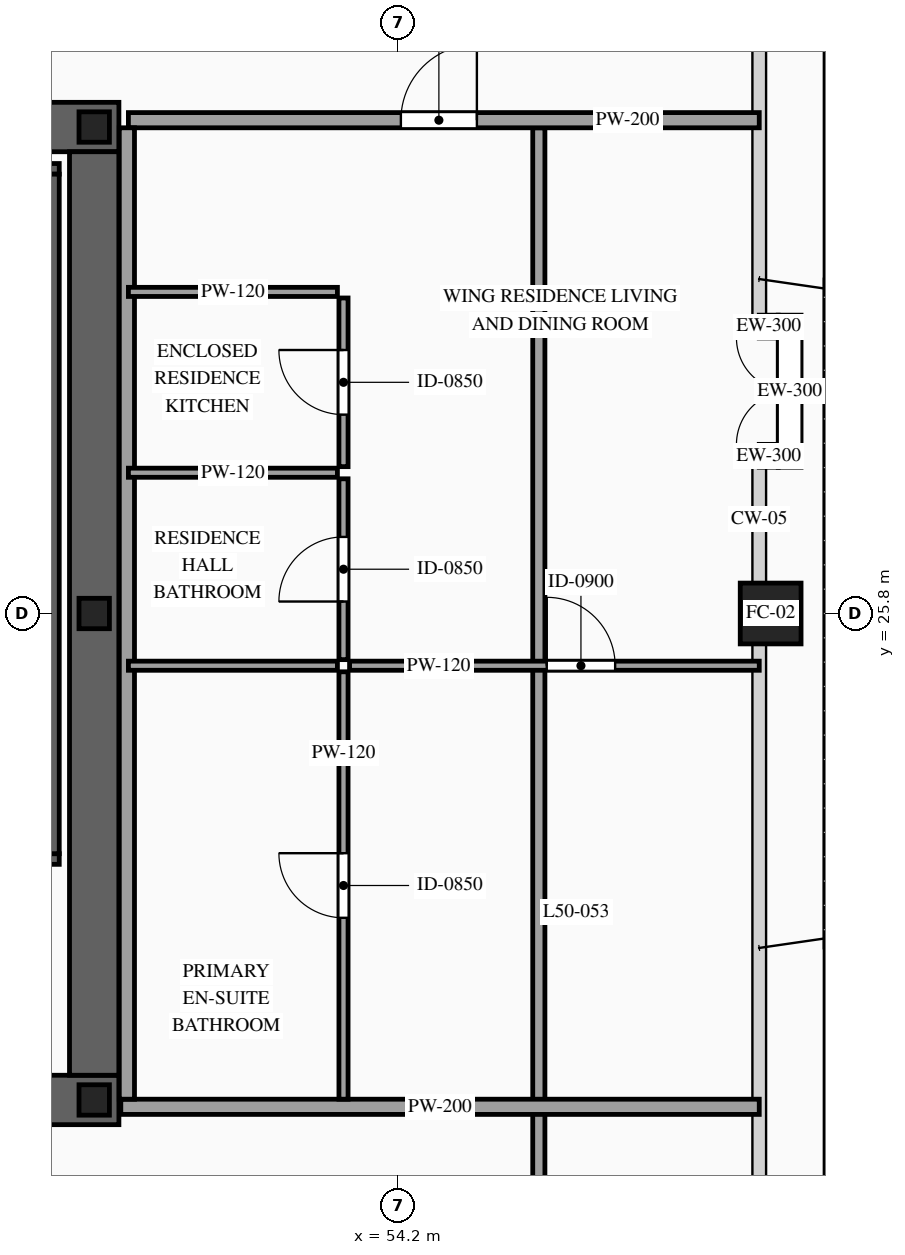
"""IFC4 building model, lengths in metres.
Left out: names, types, materials, properties, quantities, classifications, styles, units other than length and angle.
Written with IfcOpenShell. Run it as: python <this file> out.ifc"""

import sys

from ifc_helpers import new_model, si_unit, direction, frame, frame_2d, origin, origin_2d, place, context, subcontext, project, spatial, rectangle, hollow_rectangle, i_section, extrude, source, transform, mapped, element, fill, save


model = new_model("IFC4")
c1 = context("Model", 3, precision=1e-05, world=origin(), true_north=direction((0.0, 1.0)))
c2 = subcontext(c1, "Body", "Model", "MODEL_VIEW")
j1 = project(units=[si_unit("LENGTHUNIT", "METRE"), si_unit("PLANEANGLEUNIT", "RADIAN")], contexts=[c1])
p1 = place(None, origin())
s1 = spatial("IfcSite", under=j1, at=p1, CompositionType="ELEMENT")
p2 = place(p1, origin())
s2 = spatial("IfcBuilding", under=s1, at=p2, CompositionType="ELEMENT")
p3 = place(p2, frame((0.0, 0.0, 191.5)))
s3 = spatial("IfcBuildingStorey", under=s2, at=p3, CompositionType="ELEMENT", Elevation=191.5)
p4 = place(p3, frame((23.475, 19.4, 0.0), z_axis=(0.0, 0.0, 1.0), x_axis=(1.0, 0.0, 0.0)))
e1 = element("IfcWall", 1, at=p4, inside=s3, PredefinedType="SHEAR", context=c2, shape_type="SweptSolid", body=[
    extrude(rectangle(XDim=27.05, YDim=0.65, at=frame_2d((13.525, 0.0))), origin(), (0.0, 0.0, 1.0), 3.5),
])
p5 = place(p4, frame((1.975, 0.0, 0.0)))
e2 = element("IfcOpeningElement", 2, at=p5, cuts=e1, PredefinedType="OPENING", context=c2, shape_type="SweptSolid", body=[
    extrude(rectangle(XDim=1.1, YDim=2.2, at=frame_2d((0.55, 1.1))), frame((0.0, 0.34, 0.0), z_axis=(0.0, -1.0, 0.0), x_axis=(1.0, 0.0, 0.0)), (0.0, 0.0, 1.0), 0.68),
])
p6 = place(p4, frame((9.875, 0.0, 0.0)))
e3 = element("IfcOpeningElement", 3, at=p6, cuts=e1, PredefinedType="OPENING", context=c2, shape_type="SweptSolid", body=[
    extrude(rectangle(XDim=1.1, YDim=2.2, at=frame_2d((0.55, 1.1))), frame((0.0, 0.34, 0.0), z_axis=(0.0, -1.0, 0.0), x_axis=(1.0, 0.0, 0.0)), (0.0, 0.0, 1.0), 0.68),
])
p7 = place(p4, frame((23.075, 0.0, 0.0)))
e4 = element("IfcOpeningElement", 4, at=p7, cuts=e1, PredefinedType="OPENING", context=c2, shape_type="SweptSolid", body=[
    extrude(rectangle(XDim=1.1, YDim=2.2, at=frame_2d((0.55, 1.1))), frame((0.0, 0.34, 0.0), z_axis=(0.0, -1.0, 0.0), x_axis=(1.0, 0.0, 0.0)), (0.0, 0.0, 1.0), 0.68),
])
p8 = place(p4, frame((19.695, 0.0, 0.0)))
e5 = element("IfcOpeningElement", 5, at=p8, cuts=e1, PredefinedType="OPENING", context=c2, shape_type="SweptSolid", body=[
    extrude(rectangle(XDim=0.9, YDim=2.15, at=frame_2d((0.45, 1.075))), frame((0.0, 0.34, 0.0), z_axis=(0.0, -1.0, 0.0), x_axis=(1.0, 0.0, 0.0)), (0.0, 0.0, 1.0), 0.68),
])
p9 = place(p4, frame((18.255, 0.0, 0.0)))
e6 = element("IfcOpeningElement", 6, at=p9, cuts=e1, PredefinedType="OPENING", context=c2, shape_type="SweptSolid", body=[
    extrude(rectangle(XDim=0.9, YDim=2.15, at=frame_2d((0.45, 1.075))), frame((0.0, 0.34, 0.0), z_axis=(0.0, -1.0, 0.0), x_axis=(1.0, 0.0, 0.0)), (0.0, 0.0, 1.0), 0.68),
])
p10 = place(p3, frame((23.475, 32.2, 0.0), z_axis=(0.0, 0.0, 1.0), x_axis=(1.0, 0.0, 0.0)))
e7 = element("IfcWall", 7, at=p10, inside=s3, PredefinedType="SHEAR", context=c2, shape_type="SweptSolid", body=[
    extrude(rectangle(XDim=27.05, YDim=0.65, at=frame_2d((13.525, 0.0))), origin(), (0.0, 0.0, 1.0), 3.5),
])
p11 = place(p10, frame((4.595, 0.0, 0.0)))
e8 = element("IfcOpeningElement", 8, at=p11, cuts=e7, PredefinedType="OPENING", context=c2, shape_type="SweptSolid", body=[
    extrude(rectangle(XDim=0.9, YDim=2.15, at=frame_2d((0.45, 1.075))), frame((0.0, 0.34, 0.0), z_axis=(0.0, -1.0, 0.0), x_axis=(1.0, 0.0, 0.0)), (0.0, 0.0, 1.0), 0.68),
])
p12 = place(p10, frame((9.875, 0.0, 0.0)))
e9 = element("IfcOpeningElement", 9, at=p12, cuts=e7, PredefinedType="OPENING", context=c2, shape_type="SweptSolid", body=[
    extrude(rectangle(XDim=1.1, YDim=2.2, at=frame_2d((0.55, 1.1))), frame((0.0, 0.34, 0.0), z_axis=(0.0, -1.0, 0.0), x_axis=(1.0, 0.0, 0.0)), (0.0, 0.0, 1.0), 0.68),
])
p13 = place(p10, frame((15.725, 0.0, 0.0)))
e10 = element("IfcOpeningElement", 10, at=p13, cuts=e7, PredefinedType="OPENING", context=c2, shape_type="SweptSolid", body=[
    extrude(rectangle(XDim=1.1, YDim=2.2, at=frame_2d((0.55, 1.1))), frame((0.0, 0.34, 0.0), z_axis=(0.0, -1.0, 0.0), x_axis=(1.0, 0.0, 0.0)), (0.0, 0.0, 1.0), 0.68),
])
p14 = place(p10, frame((18.255, 0.0, 0.0)))
e11 = element("IfcOpeningElement", 11, at=p14, cuts=e7, PredefinedType="OPENING", context=c2, shape_type="SweptSolid", body=[
    extrude(rectangle(XDim=0.9, YDim=2.15, at=frame_2d((0.45, 1.075))), frame((0.0, 0.34, 0.0), z_axis=(0.0, -1.0, 0.0), x_axis=(1.0, 0.0, 0.0)), (0.0, 0.0, 1.0), 0.68),
])
p15 = place(p10, frame((19.695, 0.0, 0.0)))
e12 = element("IfcOpeningElement", 12, at=p15, cuts=e7, PredefinedType="OPENING", context=c2, shape_type="SweptSolid", body=[
    extrude(rectangle(XDim=0.9, YDim=2.15, at=frame_2d((0.45, 1.075))), frame((0.0, 0.34, 0.0), z_axis=(0.0, -1.0, 0.0), x_axis=(1.0, 0.0, 0.0)), (0.0, 0.0, 1.0), 0.68),
])
m1 = source(origin(), c2, "Body", "SweptSolid", [
    extrude(rectangle(XDim=12.15, YDim=0.65, at=frame_2d((6.075, 0.0))), origin(), (0.0, 0.0, 1.0), 3.5),
])
p16 = place(p3, frame((50.2, 19.725, 0.0), z_axis=(0.0, 0.0, 1.0), x_axis=(0.0, 1.0, 0.0)))
e13 = element("IfcWall", 13, at=p16, inside=s3, PredefinedType="SHEAR", context=c2, shape_type="MappedRepresentation", body=[
    mapped(m1, transform((0.0, 0.0, 0.0), scale=1.0)),
])
m2 = source(origin(), c2, "Body", "SweptSolid", [
    extrude(i_section(OverallWidth=0.4, OverallDepth=0.4, WebThickness=0.013, FlangeThickness=0.021, at=origin_2d()), origin(), (0.0, 0.0, 1.0), 3.5),
])
for number, where, z_axis, x_axis in (
    (14, (50.2, 19.4, 0.0), (0.0, 0.0, 1.0), (1.0, 0.0, 0.0)),
    (15, (50.2, 25.8, 0.0), (0.0, 0.0, 1.0), (1.0, 0.0, 0.0)),
    (16, (50.2, 32.2, 0.0), (0.0, 0.0, 1.0), (1.0, 0.0, 0.0)),
):
    element("IfcColumn", number, at=place(p3, frame(where, z_axis=z_axis, x_axis=x_axis)), inside=s3, PredefinedType="COLUMN", context=c2, shape_type="MappedRepresentation", body=[
        mapped(m2, transform((0.0, 0.0, 0.0), scale=1.0)),
    ])
m3 = source(origin(), c2, "Body", "SweptSolid", [
    extrude(hollow_rectangle(XDim=0.8, YDim=0.8, WallThickness=0.036, at=origin_2d()), origin(), (0.0, 0.0, 1.0), 3.5),
])
p17 = place(p3, frame((59.1, 25.8, 0.0), z_axis=(0.0, 0.0, 1.0), x_axis=(1.0, 0.0, 0.0)))
e17 = element("IfcColumn", 17, at=p17, inside=s3, PredefinedType="COLUMN", context=c2, shape_type="MappedRepresentation", body=[
    mapped(m3, transform((0.0, 0.0, 0.0), scale=1.0)),
])
p18 = place(p3, frame((59.35, 27.725, 0.0), z_axis=(0.0, 0.0, 1.0), x_axis=(0.0, 1.0, 0.0)))
e18 = element("IfcWall", 18, at=p18, inside=s3, PredefinedType="SOLIDWALL", context=c2, shape_type="SweptSolid", body=[
    extrude(rectangle(XDim=2.0, YDim=0.3, at=frame_2d((1.0, 0.0))), origin(), (0.0, 0.0, 1.0), 2.835),
])
p19 = place(p18, frame((0.3, 0.0, 0.0)))
e19 = element("IfcOpeningElement", 19, at=p19, cuts=e18, PredefinedType="OPENING", context=c2, shape_type="SweptSolid", body=[
    extrude(rectangle(XDim=1.4, YDim=2.3, at=frame_2d((0.7, 1.15))), frame((0.0, 0.165, 0.0), z_axis=(0.0, -1.0, 0.0), x_axis=(1.0, 0.0, 0.0)), (0.0, 0.0, 1.0), 0.33),
])
m4 = source(origin(), c2, "Body", "SweptSolid", [
    extrude(rectangle(XDim=0.25, YDim=0.3, at=frame_2d((0.125, 0.0))), origin(), (0.0, 0.0, 1.0), 3.28),
])
for number, where, z_axis, x_axis in (
    (20, (58.95, 27.875, 0.0), (0.0, 0.0, 1.0), (1.0, 0.0, 0.0)),
    (21, (59.2, 29.575, 0.0), (0.0, 0.0, 1.0), (-1.0, 0.0, 0.0)),
):
    element("IfcWall", number, at=place(p3, frame(where, z_axis=z_axis, x_axis=x_axis)), inside=s3, PredefinedType="SOLIDWALL", context=c2, shape_type="MappedRepresentation", body=[
        mapped(m4, transform((0.0, 0.0, 0.0), scale=1.0)),
    ])
p20 = place(p3, frame((46.46, 22.57, 0.0), z_axis=(0.0, 0.0, 1.0), x_axis=(1.0, 0.0, 0.0)))
e22 = element("IfcWall", 22, at=p20, inside=s3, PredefinedType="SOLIDWALL", context=c2, shape_type="SweptSolid", body=[
    extrude(rectangle(XDim=3.28, YDim=0.14, at=frame_2d((1.64, 0.0))), origin(), (0.0, 0.0, 1.0), 3.28),
])
p21 = place(p20, frame((1.09, 0.0, 0.0)))
e23 = element("IfcOpeningElement", 23, at=p21, cuts=e22, PredefinedType="OPENING", context=c2, shape_type="SweptSolid", body=[
    extrude(rectangle(XDim=1.1, YDim=2.2, at=frame_2d((0.55, 1.1))), frame((0.0, 0.085, 0.0), z_axis=(0.0, -1.0, 0.0), x_axis=(1.0, 0.0, 0.0)), (0.0, 0.0, 1.0), 0.17),
])
m5 = source(origin(), c2, "Body", "SweptSolid", [
    extrude(rectangle(XDim=3.28, YDim=0.14, at=frame_2d((1.64, 0.0))), origin(), (0.0, 0.0, 1.0), 3.28),
])
p22 = place(p3, frame((46.46, 31.65, 0.0), z_axis=(0.0, 0.0, 1.0), x_axis=(1.0, 0.0, 0.0)))
e24 = element("IfcWall", 24, at=p22, inside=s3, PredefinedType="SOLIDWALL", context=c2, shape_type="MappedRepresentation", body=[
    mapped(m5, transform((0.0, 0.0, 0.0), scale=1.0)),
])
m6 = source(origin(), c2, "Body", "SweptSolid", [
    extrude(rectangle(XDim=8.94, YDim=0.14, at=frame_2d((4.47, 0.0))), origin(), (0.0, 0.0, 1.0), 3.28),
])
p23 = place(p3, frame((49.67, 22.64, 0.0), z_axis=(0.0, 0.0, 1.0), x_axis=(0.0, 1.0, 0.0)))
e25 = element("IfcWall", 25, at=p23, inside=s3, PredefinedType="SOLIDWALL", context=c2, shape_type="MappedRepresentation", body=[
    mapped(m6, transform((0.0, 0.0, 0.0), scale=1.0)),
])
m7 = source(origin(), c2, "Body", "SweptSolid", [
    extrude(rectangle(XDim=28.19, YDim=0.16, at=frame_2d((14.095, 0.0))), origin(), (0.0, 0.0, 1.0), 3.28),
])
p24 = place(p3, frame((56.05, 4.0, 0.0), z_axis=(0.0, 0.0, 1.0), x_axis=(0.0, 1.0, 0.0)))
e26 = element("IfcWall", 26, at=p24, inside=s3, PredefinedType="PARTITIONING", context=c2, shape_type="MappedRepresentation", body=[
    mapped(m7, transform((0.0, 0.0, 0.0), scale=1.0)),
])
p25 = place(p3, frame((50.65, 32.29, 0.0), z_axis=(0.0, 0.0, 1.0), x_axis=(1.0, 0.0, 0.0)))
e27 = element("IfcWall", 27, at=p25, inside=s3, PredefinedType="PARTITIONING", context=c2, shape_type="SweptSolid", body=[
    extrude(rectangle(XDim=8.3, YDim=0.2, at=frame_2d((4.15, 0.0))), origin(), (0.0, 0.0, 1.0), 2.775),
])
p26 = place(p25, frame((3.585, 0.0, 0.0)))
e28 = element("IfcOpeningElement", 28, at=p26, cuts=e27, PredefinedType="OPENING", context=c2, shape_type="SweptSolid", body=[
    extrude(rectangle(XDim=1.0, YDim=2.2, at=frame_2d((0.5, 1.1))), frame((0.0, 0.115, 0.0), z_axis=(0.0, -1.0, 0.0), x_axis=(1.0, 0.0, 0.0)), (0.0, 0.0, 1.0), 0.23),
])
m8 = source(origin(), c2, "Body", "SweptSolid", [
    extrude(rectangle(XDim=8.4, YDim=0.2, at=frame_2d((4.2, 0.0))), origin(), (0.0, 0.0, 1.0), 2.775),
])
p27 = place(p3, frame((50.55, 19.31, 0.0), z_axis=(0.0, 0.0, 1.0), x_axis=(1.0, 0.0, 0.0)))
e29 = element("IfcWall", 29, at=p27, inside=s3, PredefinedType="PARTITIONING", context=c2, shape_type="MappedRepresentation", body=[
    mapped(m8, transform((0.0, 0.0, 0.0), scale=1.0)),
])
m9 = source(origin(), c2, "Body", "SweptSolid", [
    extrude(rectangle(XDim=12.78, YDim=0.2, at=frame_2d((6.39, 0.0))), origin(), (0.0, 0.0, 1.0), 3.28),
])
p28 = place(p3, frame((50.63, 19.41, 0.0), z_axis=(0.0, 0.0, 1.0), x_axis=(0.0, 1.0, 0.0)))
e30 = element("IfcWall", 30, at=p28, inside=s3, PredefinedType="PARTITIONING", context=c2, shape_type="MappedRepresentation", body=[
    mapped(m9, transform((0.0, 0.0, 0.0), scale=1.0)),
])
m10 = source(origin(), c2, "Body", "SweptSolid", [
    extrude(rectangle(XDim=2.75, YDim=0.12, at=frame_2d((1.375, 0.0))), origin(), (0.0, 0.0, 1.0), 3.28),
])
for number, where, z_axis, x_axis in (
    (31, (50.65, 25.113, 0.0), (0.0, 0.0, 1.0), (1.0, 0.0, 0.0)),
    (32, (50.65, 27.652, 0.0), (0.0, 0.0, 1.0), (1.0, 0.0, 0.0)),
):
    element("IfcWall", number, at=place(p3, frame(where, z_axis=z_axis, x_axis=x_axis)), inside=s3, PredefinedType="PARTITIONING", context=c2, shape_type="MappedRepresentation", body=[
        mapped(m10, transform((0.0, 0.0, 0.0), scale=1.0)),
    ])
p29 = place(p3, frame((53.48, 25.193, 0.0), z_axis=(0.0, 0.0, 1.0), x_axis=(0.0, 1.0, 0.0)))
e33 = element("IfcWall", 33, at=p29, inside=s3, PredefinedType="PARTITIONING", context=c2, shape_type="SweptSolid", body=[
    extrude(rectangle(XDim=2.379, YDim=0.12, at=frame_2d((1.189, 0.0))), origin(), (0.0, 0.0, 1.0), 3.28),
])
p30 = place(p29, frame((0.764, 0.0, 0.0)))
e34 = element("IfcOpeningElement", 34, at=p30, cuts=e33, PredefinedType="OPENING", context=c2, shape_type="SweptSolid", body=[
    extrude(rectangle(XDim=0.85, YDim=2.1, at=frame_2d((0.425, 1.05))), frame((0.0, 0.075, 0.0), z_axis=(0.0, -1.0, 0.0), x_axis=(1.0, 0.0, 0.0)), (0.0, 0.0, 1.0), 0.15),
])
p31 = place(p3, frame((50.65, 30.031, 0.0), z_axis=(0.0, 0.0, 1.0), x_axis=(1.0, 0.0, 0.0)))
e35 = element("IfcWall", 35, at=p31, inside=s3, PredefinedType="PARTITIONING", context=c2, shape_type="MappedRepresentation", body=[
    mapped(m10, transform((0.0, 0.0, 0.0), scale=1.0)),
])
p32 = place(p3, frame((53.48, 27.732, 0.0), z_axis=(0.0, 0.0, 1.0), x_axis=(0.0, 1.0, 0.0)))
e36 = element("IfcWall", 36, at=p32, inside=s3, PredefinedType="PARTITIONING", context=c2, shape_type="SweptSolid", body=[
    extrude(rectangle(XDim=2.219, YDim=0.12, at=frame_2d((1.109, 0.0))), origin(), (0.0, 0.0, 1.0), 3.28),
])
p33 = place(p32, frame((0.685, 0.0, 0.0)))
e37 = element("IfcOpeningElement", 37, at=p33, cuts=e36, PredefinedType="OPENING", context=c2, shape_type="SweptSolid", body=[
    extrude(rectangle(XDim=0.85, YDim=2.1, at=frame_2d((0.425, 1.05))), frame((0.0, 0.075, 0.0), z_axis=(0.0, -1.0, 0.0), x_axis=(1.0, 0.0, 0.0)), (0.0, 0.0, 1.0), 0.15),
])
p34 = place(p3, frame((53.56, 25.113, 0.0), z_axis=(0.0, 0.0, 1.0), x_axis=(1.0, 0.0, 0.0)))
e38 = element("IfcWall", 38, at=p34, inside=s3, PredefinedType="PARTITIONING", context=c2, shape_type="SweptSolid", body=[
    extrude(rectangle(XDim=5.39, YDim=0.12, at=frame_2d((2.695, 0.0))), origin(), (0.0, 0.0, 1.0), 3.28),
])
p35 = place(p34, frame((2.594, 0.0, 0.0)))
e39 = element("IfcOpeningElement", 39, at=p35, cuts=e38, PredefinedType="OPENING", context=c2, shape_type="SweptSolid", body=[
    extrude(rectangle(XDim=0.9, YDim=2.15, at=frame_2d((0.45, 1.075))), frame((0.0, 0.075, 0.0), z_axis=(0.0, -1.0, 0.0), x_axis=(1.0, 0.0, 0.0)), (0.0, 0.0, 1.0), 0.15),
])
p36 = place(p3, frame((53.48, 19.41, 0.0), z_axis=(0.0, 0.0, 1.0), x_axis=(0.0, 1.0, 0.0)))
e40 = element("IfcWall", 40, at=p36, inside=s3, PredefinedType="PARTITIONING", context=c2, shape_type="SweptSolid", body=[
    extrude(rectangle(XDim=5.623, YDim=0.12, at=frame_2d((2.812, 0.0))), origin(), (0.0, 0.0, 1.0), 3.28),
])
p37 = place(p36, frame((2.386, 0.0, 0.0)))
e41 = element("IfcOpeningElement", 41, at=p37, cuts=e40, PredefinedType="OPENING", context=c2, shape_type="SweptSolid", body=[
    extrude(rectangle(XDim=0.85, YDim=2.1, at=frame_2d((0.425, 1.05))), frame((0.0, 0.075, 0.0), z_axis=(0.0, -1.0, 0.0), x_axis=(1.0, 0.0, 0.0)), (0.0, 0.0, 1.0), 0.15),
])
m11 = source(origin(), c2, "Body", "SweptSolid", [
    extrude(rectangle(XDim=1.4, YDim=2.3, at=frame_2d((0.7, 1.15))), frame((0.0, 0.025, 0.0), z_axis=(0.0, -1.0, 0.0), x_axis=(1.0, 0.0, 0.0)), (0.0, 0.0, 1.0), 0.05),
])
p38 = place(p19, origin())
e42 = element("IfcDoor", 42, at=p38, inside=s3, OperationType="DOUBLE_DOOR_SINGLE_SWING", PredefinedType="DOOR", context=c2, shape_type="MappedRepresentation", body=[
    mapped(m11, transform((0.0, 0.0, 0.0), scale=1.0)),
])
fill(e19, e42)
m12 = source(origin(), c2, "Body", "SweptSolid", [
    extrude(rectangle(XDim=1.0, YDim=2.2, at=frame_2d((0.5, 1.1))), frame((0.0, 0.025, 0.0), z_axis=(0.0, -1.0, 0.0), x_axis=(1.0, 0.0, 0.0)), (0.0, 0.0, 1.0), 0.05),
])
p39 = place(p26, origin())
e43 = element("IfcDoor", 43, at=p39, inside=s3, OperationType="SINGLE_SWING_RIGHT", PredefinedType="DOOR", context=c2, shape_type="MappedRepresentation", body=[
    mapped(m12, transform((0.0, 0.0, 0.0), scale=1.0)),
])
fill(e28, e43)
m13 = source(origin(), c2, "Body", "SweptSolid", [
    extrude(rectangle(XDim=0.85, YDim=2.1, at=frame_2d((0.425, 1.05))), frame((0.0, 0.025, 0.0), z_axis=(0.0, -1.0, 0.0), x_axis=(1.0, 0.0, 0.0)), (0.0, 0.0, 1.0), 0.05),
])
p40 = place(p30, origin())
e44 = element("IfcDoor", 44, at=p40, inside=s3, OperationType="SINGLE_SWING_LEFT", PredefinedType="DOOR", context=c2, shape_type="MappedRepresentation", body=[
    mapped(m13, transform((0.0, 0.0, 0.0), scale=1.0)),
])
fill(e34, e44)
p41 = place(p33, origin())
e45 = element("IfcDoor", 45, at=p41, inside=s3, OperationType="SINGLE_SWING_RIGHT", PredefinedType="DOOR", context=c2, shape_type="MappedRepresentation", body=[
    mapped(m13, transform((0.0, 0.0, 0.0), scale=1.0)),
])
fill(e37, e45)
m14 = source(origin(), c2, "Body", "SweptSolid", [
    extrude(rectangle(XDim=0.9, YDim=2.15, at=frame_2d((0.45, 1.075))), frame((0.0, 0.025, 0.0), z_axis=(0.0, -1.0, 0.0), x_axis=(1.0, 0.0, 0.0)), (0.0, 0.0, 1.0), 0.05),
])
p42 = place(p35, origin())
e46 = element("IfcDoor", 46, at=p42, inside=s3, OperationType="SINGLE_SWING_LEFT", PredefinedType="DOOR", context=c2, shape_type="MappedRepresentation", body=[
    mapped(m14, transform((0.0, 0.0, 0.0), scale=1.0)),
])
fill(e39, e46)
p43 = place(p37, origin())
e47 = element("IfcDoor", 47, at=p43, inside=s3, OperationType="SINGLE_SWING_RIGHT", PredefinedType="DOOR", context=c2, shape_type="MappedRepresentation", body=[
    mapped(m13, transform((0.0, 0.0, 0.0), scale=1.0)),
])
fill(e41, e47)
save(model, sys.argv[1])
